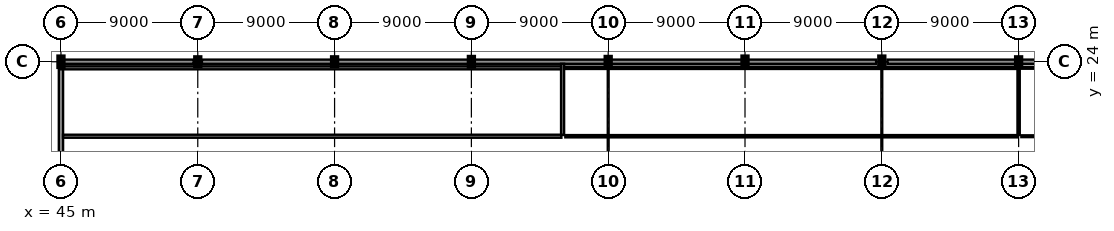
"""IFC4 building model, lengths in metres.
Left out: names, types, materials, properties, quantities, classifications, styles, units other than length and angle.
Written with IfcOpenShell. Run it as: python <this file> out.ifc"""

import sys

from ifc_helpers import new_model, si_unit, direction, frame, frame_2d, origin, origin_2d, place, context, subcontext, project, spatial, rectangle, i_section, extrude, element, fill, save


model = new_model("IFC4")
c1 = context("Model", 3, precision=1e-05, world=origin(), true_north=direction((0.0, 1.0)))
c2 = subcontext(c1, "Body", "Model", "MODEL_VIEW")
j1 = project(units=[si_unit("LENGTHUNIT", "METRE"), si_unit("PLANEANGLEUNIT", "RADIAN")], contexts=[c1])
p1 = place(None, origin())
s1 = spatial("IfcSite", under=j1, at=p1, CompositionType="ELEMENT")
p2 = place(p1, origin())
s2 = spatial("IfcBuilding", under=s1, at=p2, CompositionType="ELEMENT")
p3 = place(p2, frame((0.0, 0.0, 23.4)))
s3 = spatial("IfcBuildingStorey", under=s2, at=p3, CompositionType="ELEMENT", Elevation=23.4)
p4 = place(p3, frame((45.0, 24.0, 0.0), z_axis=(0.0, 0.0, 1.0), x_axis=(1.0, 0.0, 0.0)))
e1 = element("IfcColumn", 1, at=p4, inside=s3, PredefinedType="COLUMN", context=c2, shape_type="SweptSolid", body=[
    extrude(i_section(OverallWidth=0.3, OverallDepth=0.65, WebThickness=0.016, FlangeThickness=0.031, at=origin_2d()), origin(), (0.0, 0.0, 1.0), 4.0),
])
for number, where, z_axis, x_axis in (
    (2, (54.0, 24.0, 0.0), (0.0, 0.0, 1.0), (0.0, 1.0, 0.0)),
    (3, (63.0, 24.0, 0.0), (0.0, 0.0, 1.0), (1.0, 0.0, 0.0)),
):
    element("IfcColumn", number, at=place(p3, frame(where, z_axis=z_axis, x_axis=x_axis)), inside=s3, PredefinedType="COLUMN", context=c2, shape_type="SweptSolid", body=[
        extrude(i_section(OverallWidth=0.3, OverallDepth=0.55, WebThickness=0.015, FlangeThickness=0.029, at=origin_2d()), origin(), (0.0, 0.0, 1.0), 4.0),
    ])
for number, where, z_axis, x_axis in (
    (4, (72.0, 24.0, 0.0), (0.0, 0.0, 1.0), (1.0, 0.0, 0.0)),
    (5, (81.0, 24.0, 0.0), (0.0, 0.0, 1.0), (1.0, 0.0, 0.0)),
):
    element("IfcColumn", number, at=place(p3, frame(where, z_axis=z_axis, x_axis=x_axis)), inside=s3, PredefinedType="COLUMN", context=c2, shape_type="SweptSolid", body=[
        extrude(i_section(OverallWidth=0.3, OverallDepth=0.6, WebThickness=0.015, FlangeThickness=0.03, at=origin_2d()), origin(), (0.0, 0.0, 1.0), 4.0),
    ])
for number, where, z_axis, x_axis in (
    (6, (90.0, 24.0, 0.0), (0.0, 0.0, 1.0), (1.0, 0.0, 0.0)),
    (7, (99.0, 24.0, 0.0), (0.0, 0.0, 1.0), (0.0, 1.0, 0.0)),
):
    element("IfcColumn", number, at=place(p3, frame(where, z_axis=z_axis, x_axis=x_axis)), inside=s3, PredefinedType="COLUMN", context=c2, shape_type="SweptSolid", body=[
        extrude(i_section(OverallWidth=0.3, OverallDepth=0.65, WebThickness=0.016, FlangeThickness=0.031, at=origin_2d()), origin(), (0.0, 0.0, 1.0), 4.0),
    ])
p5 = place(p3, frame((108.0, 24.0, 0.0), z_axis=(0.0, 0.0, 1.0), x_axis=(1.0, 0.0, 0.0)))
e8 = element("IfcColumn", 8, at=p5, inside=s3, PredefinedType="COLUMN", context=c2, shape_type="SweptSolid", body=[
    extrude(i_section(OverallWidth=0.3, OverallDepth=0.55, WebThickness=0.015, FlangeThickness=0.029, at=origin_2d()), origin(), (0.0, 0.0, 1.0), 4.0),
])
p6 = place(p3, frame((80.942, 24.0, 0.0), z_axis=(0.0, 0.0, 1.0), x_axis=(-1.0, 0.0, 0.0)))
e9 = element("IfcWall", 9, at=p6, inside=s3, PredefinedType="SOLIDWALL", context=c2, shape_type="SweptSolid", body=[
    extrude(rectangle(XDim=8.934, YDim=0.28, at=frame_2d((4.467, 0.0))), origin(), (0.0, 0.0, 1.0), 3.315),
])
p7 = place(p6, frame((3.182, 0.0, 0.85)))
e10 = element("IfcOpeningElement", 10, at=p7, cuts=e9, PredefinedType="OPENING", context=c2, shape_type="SweptSolid", body=[
    extrude(rectangle(XDim=2.0, YDim=2.0, at=frame_2d((1.0, 1.0))), frame((0.0, 0.155, 0.0), z_axis=(0.0, -1.0, 0.0), x_axis=(1.0, 0.0, 0.0)), (0.0, 0.0, 1.0), 0.31),
])
p8 = place(p3, frame((71.992, 24.0, 0.0), z_axis=(0.0, 0.0, 1.0), x_axis=(-1.0, 0.0, 0.0)))
e11 = element("IfcWall", 11, at=p8, inside=s3, PredefinedType="SOLIDWALL", context=c2, shape_type="SweptSolid", body=[
    extrude(rectangle(XDim=8.984, YDim=0.28, at=frame_2d((4.492, 0.0))), origin(), (0.0, 0.0, 1.0), 2.747),
])
p9 = place(p8, frame((2.045, 0.0, 0.9)))
e12 = element("IfcOpeningElement", 12, at=p9, cuts=e11, PredefinedType="OPENING", context=c2, shape_type="SweptSolid", body=[
    extrude(rectangle(XDim=1.3, YDim=1.3, at=frame_2d((0.65, 0.65))), frame((0.0, 0.155, 0.0), z_axis=(0.0, -1.0, 0.0), x_axis=(1.0, 0.0, 0.0)), (0.0, 0.0, 1.0), 0.31),
])
p10 = place(p8, frame((5.639, 0.0, 0.9)))
e13 = element("IfcOpeningElement", 13, at=p10, cuts=e11, PredefinedType="OPENING", context=c2, shape_type="SweptSolid", body=[
    extrude(rectangle(XDim=1.3, YDim=1.3, at=frame_2d((0.65, 0.65))), frame((0.0, 0.155, 0.0), z_axis=(0.0, -1.0, 0.0), x_axis=(1.0, 0.0, 0.0)), (0.0, 0.0, 1.0), 0.31),
])
p11 = place(p3, frame((62.992, 24.0, 0.0), z_axis=(0.0, 0.0, 1.0), x_axis=(-1.0, 0.0, 0.0)))
e14 = element("IfcWall", 14, at=p11, inside=s3, PredefinedType="SOLIDWALL", context=c2, shape_type="SweptSolid", body=[
    extrude(rectangle(XDim=8.719, YDim=0.28, at=frame_2d((4.359, 0.0))), origin(), (0.0, 0.0, 1.0), 2.747),
])
p12 = place(p11, frame((1.966, 0.0, 0.9)))
e15 = element("IfcOpeningElement", 15, at=p12, cuts=e14, PredefinedType="OPENING", context=c2, shape_type="SweptSolid", body=[
    extrude(rectangle(XDim=1.3, YDim=1.3, at=frame_2d((0.65, 0.65))), frame((0.0, 0.155, 0.0), z_axis=(0.0, -1.0, 0.0), x_axis=(1.0, 0.0, 0.0)), (0.0, 0.0, 1.0), 0.31),
])
p13 = place(p11, frame((5.453, 0.0, 0.9)))
e16 = element("IfcOpeningElement", 16, at=p13, cuts=e14, PredefinedType="OPENING", context=c2, shape_type="SweptSolid", body=[
    extrude(rectangle(XDim=1.3, YDim=1.3, at=frame_2d((0.65, 0.65))), frame((0.0, 0.155, 0.0), z_axis=(0.0, -1.0, 0.0), x_axis=(1.0, 0.0, 0.0)), (0.0, 0.0, 1.0), 0.31),
])
p14 = place(p3, frame((53.727, 24.0, 0.0), z_axis=(0.0, 0.0, 1.0), x_axis=(-1.0, 0.0, 0.0)))
e17 = element("IfcWall", 17, at=p14, inside=s3, PredefinedType="SOLIDWALL", context=c2, shape_type="SweptSolid", body=[
    extrude(rectangle(XDim=8.719, YDim=0.28, at=frame_2d((4.359, 0.0))), origin(), (0.0, 0.0, 1.0), 2.747),
])
p15 = place(p14, frame((1.966, 0.0, 0.9)))
e18 = element("IfcOpeningElement", 18, at=p15, cuts=e17, PredefinedType="OPENING", context=c2, shape_type="SweptSolid", body=[
    extrude(rectangle(XDim=1.3, YDim=1.3, at=frame_2d((0.65, 0.65))), frame((0.0, 0.155, 0.0), z_axis=(0.0, -1.0, 0.0), x_axis=(1.0, 0.0, 0.0)), (0.0, 0.0, 1.0), 0.31),
])
p16 = place(p14, frame((5.453, 0.0, 0.9)))
e19 = element("IfcOpeningElement", 19, at=p16, cuts=e17, PredefinedType="OPENING", context=c2, shape_type="SweptSolid", body=[
    extrude(rectangle(XDim=1.3, YDim=1.3, at=frame_2d((0.65, 0.65))), frame((0.0, 0.155, 0.0), z_axis=(0.0, -1.0, 0.0), x_axis=(1.0, 0.0, 0.0)), (0.0, 0.0, 1.0), 0.31),
])
p17 = place(p3, frame((45.0, 23.677, 0.0), z_axis=(0.0, 0.0, 1.0), x_axis=(0.0, -1.0, 0.0)))
e20 = element("IfcWall", 20, at=p17, inside=s3, PredefinedType="SOLIDWALL", context=c2, shape_type="SweptSolid", body=[
    extrude(rectangle(XDim=11.529, YDim=0.28, at=frame_2d((5.765, 0.0))), origin(), (0.0, 0.0, 1.0), 3.155),
])
p18 = place(p17, frame((2.809, 0.0, 0.9)))
e21 = element("IfcOpeningElement", 21, at=p18, cuts=e20, PredefinedType="OPENING", context=c2, shape_type="SweptSolid", body=[
    extrude(rectangle(XDim=1.3, YDim=1.3, at=frame_2d((0.65, 0.65))), frame((0.0, 0.155, 0.0), z_axis=(0.0, -1.0, 0.0), x_axis=(1.0, 0.0, 0.0)), (0.0, 0.0, 1.0), 0.31),
])
p19 = place(p17, frame((8.117, 0.0, 0.9)))
e22 = element("IfcOpeningElement", 22, at=p19, cuts=e20, PredefinedType="OPENING", context=c2, shape_type="SweptSolid", body=[
    extrude(rectangle(XDim=1.3, YDim=1.3, at=frame_2d((0.65, 0.65))), frame((0.0, 0.155, 0.0), z_axis=(0.0, -1.0, 0.0), x_axis=(1.0, 0.0, 0.0)), (0.0, 0.0, 1.0), 0.31),
])
p20 = place(p3, frame((98.627, 24.0, 0.0), z_axis=(0.0, 0.0, 1.0), x_axis=(-1.0, 0.0, 0.0)))
e23 = element("IfcWall", 23, at=p20, inside=s3, PredefinedType="SOLIDWALL", context=c2, shape_type="SweptSolid", body=[
    extrude(rectangle(XDim=8.619, YDim=0.28, at=frame_2d((4.31, 0.0))), origin(), (0.0, 0.0, 1.0), 3.315),
])
p21 = place(p20, frame((1.413, 0.0, 0.85)))
e24 = element("IfcOpeningElement", 24, at=p21, cuts=e23, PredefinedType="OPENING", context=c2, shape_type="SweptSolid", body=[
    extrude(rectangle(XDim=2.0, YDim=2.0, at=frame_2d((1.0, 1.0))), frame((0.0, 0.155, 0.0), z_axis=(0.0, -1.0, 0.0), x_axis=(1.0, 0.0, 0.0)), (0.0, 0.0, 1.0), 0.31),
])
p22 = place(p20, frame((5.206, 0.0, 0.85)))
e25 = element("IfcOpeningElement", 25, at=p22, cuts=e23, PredefinedType="OPENING", context=c2, shape_type="SweptSolid", body=[
    extrude(rectangle(XDim=2.0, YDim=2.0, at=frame_2d((1.0, 1.0))), frame((0.0, 0.155, 0.0), z_axis=(0.0, -1.0, 0.0), x_axis=(1.0, 0.0, 0.0)), (0.0, 0.0, 1.0), 0.31),
])
p23 = place(p3, frame((89.992, 24.0, 0.0), z_axis=(0.0, 0.0, 1.0), x_axis=(-1.0, 0.0, 0.0)))
e26 = element("IfcWall", 26, at=p23, inside=s3, PredefinedType="SOLIDWALL", context=c2, shape_type="SweptSolid", body=[
    extrude(rectangle(XDim=8.934, YDim=0.28, at=frame_2d((4.467, 0.0))), origin(), (0.0, 0.0, 1.0), 3.315),
])
p24 = place(p23, frame((1.502, 0.0, 0.85)))
e27 = element("IfcOpeningElement", 27, at=p24, cuts=e26, PredefinedType="OPENING", context=c2, shape_type="SweptSolid", body=[
    extrude(rectangle(XDim=2.0, YDim=2.0, at=frame_2d((1.0, 1.0))), frame((0.0, 0.155, 0.0), z_axis=(0.0, -1.0, 0.0), x_axis=(1.0, 0.0, 0.0)), (0.0, 0.0, 1.0), 0.31),
])
p25 = place(p23, frame((5.432, 0.0, 0.85)))
e28 = element("IfcOpeningElement", 28, at=p25, cuts=e26, PredefinedType="OPENING", context=c2, shape_type="SweptSolid", body=[
    extrude(rectangle(XDim=2.0, YDim=2.0, at=frame_2d((1.0, 1.0))), frame((0.0, 0.155, 0.0), z_axis=(0.0, -1.0, 0.0), x_axis=(1.0, 0.0, 0.0)), (0.0, 0.0, 1.0), 0.31),
])
p26 = place(p3, frame((116.992, 24.0, 0.0), z_axis=(0.0, 0.0, 1.0), x_axis=(-1.0, 0.0, 0.0)))
e29 = element("IfcWall", 29, at=p26, inside=s3, PredefinedType="SOLIDWALL", context=c2, shape_type="SweptSolid", body=[
    extrude(rectangle(XDim=8.984, YDim=0.28, at=frame_2d((4.492, 0.0))), origin(), (0.0, 0.0, 1.0), 2.747),
])
p27 = place(p26, frame((2.045, 0.0, 0.9)))
e30 = element("IfcOpeningElement", 30, at=p27, cuts=e29, PredefinedType="OPENING", context=c2, shape_type="SweptSolid", body=[
    extrude(rectangle(XDim=1.3, YDim=1.3, at=frame_2d((0.65, 0.65))), frame((0.0, 0.155, 0.0), z_axis=(0.0, -1.0, 0.0), x_axis=(1.0, 0.0, 0.0)), (0.0, 0.0, 1.0), 0.31),
])
p28 = place(p26, frame((5.639, 0.0, 0.9)))
e31 = element("IfcOpeningElement", 31, at=p28, cuts=e29, PredefinedType="OPENING", context=c2, shape_type="SweptSolid", body=[
    extrude(rectangle(XDim=1.3, YDim=1.3, at=frame_2d((0.65, 0.65))), frame((0.0, 0.155, 0.0), z_axis=(0.0, -1.0, 0.0), x_axis=(1.0, 0.0, 0.0)), (0.0, 0.0, 1.0), 0.31),
])
p29 = place(p3, frame((107.992, 24.0, 0.0), z_axis=(0.0, 0.0, 1.0), x_axis=(-1.0, 0.0, 0.0)))
e32 = element("IfcWall", 32, at=p29, inside=s3, PredefinedType="SOLIDWALL", context=c2, shape_type="SweptSolid", body=[
    extrude(rectangle(XDim=8.619, YDim=0.28, at=frame_2d((4.31, 0.0))), origin(), (0.0, 0.0, 1.0), 3.315),
])
p30 = place(p29, frame((1.413, 0.0, 0.85)))
e33 = element("IfcOpeningElement", 33, at=p30, cuts=e32, PredefinedType="OPENING", context=c2, shape_type="SweptSolid", body=[
    extrude(rectangle(XDim=2.0, YDim=2.0, at=frame_2d((1.0, 1.0))), frame((0.0, 0.155, 0.0), z_axis=(0.0, -1.0, 0.0), x_axis=(1.0, 0.0, 0.0)), (0.0, 0.0, 1.0), 0.31),
])
p31 = place(p29, frame((5.206, 0.0, 0.85)))
e34 = element("IfcOpeningElement", 34, at=p31, cuts=e32, PredefinedType="OPENING", context=c2, shape_type="SweptSolid", body=[
    extrude(rectangle(XDim=2.0, YDim=2.0, at=frame_2d((1.0, 1.0))), frame((0.0, 0.155, 0.0), z_axis=(0.0, -1.0, 0.0), x_axis=(1.0, 0.0, 0.0)), (0.0, 0.0, 1.0), 0.31),
])
p32 = place(p3, frame((45.008, 23.6, 0.0), z_axis=(0.0, 0.0, 1.0), x_axis=(1.0, 0.0, 0.0)))
e35 = element("IfcWall", 35, at=p32, inside=s3, PredefinedType="PARTITIONING", context=c2, shape_type="SweptSolid", body=[
    extrude(rectangle(XDim=32.912, YDim=0.2, at=frame_2d((16.456, 0.0))), origin(), (0.0, 0.0, 1.0), 3.64),
])
p33 = place(p3, frame((78.0, 23.865, 0.0), z_axis=(0.0, 0.0, 1.0), x_axis=(0.0, -1.0, 0.0)))
e36 = element("IfcWall", 36, at=p33, inside=s3, PredefinedType="PARTITIONING", context=c2, shape_type="SweptSolid", body=[
    extrude(rectangle(XDim=4.685, YDim=0.2, at=frame_2d((2.343, 0.0))), origin(), (0.0, 0.0, 1.0), 3.555),
])
p34 = place(p3, frame((77.92, 19.1, 0.0), z_axis=(0.0, 0.0, 1.0), x_axis=(-1.0, 0.0, 0.0)))
e37 = element("IfcWall", 37, at=p34, inside=s3, PredefinedType="PARTITIONING", context=c2, shape_type="SweptSolid", body=[
    extrude(rectangle(XDim=32.785, YDim=0.2, at=frame_2d((16.393, 0.0))), origin(), (0.0, 0.0, 1.0), 3.64),
])
p35 = place(p34, frame((15.442, 0.0, 0.0)))
e38 = element("IfcOpeningElement", 38, at=p35, cuts=e37, PredefinedType="OPENING", context=c2, shape_type="SweptSolid", body=[
    extrude(rectangle(XDim=1.9, YDim=2.5, at=frame_2d((0.95, 1.25))), frame((0.0, 0.115, 0.0), z_axis=(0.0, -1.0, 0.0), x_axis=(1.0, 0.0, 0.0)), (0.0, 0.0, 1.0), 0.23),
])
p36 = place(p3, frame((108.0, 23.52, 0.0), z_axis=(0.0, 0.0, 1.0), x_axis=(0.0, -1.0, 0.0)))
e39 = element("IfcWall", 39, at=p36, inside=s3, PredefinedType="PARTITIONING", context=c2, shape_type="SweptSolid", body=[
    extrude(rectangle(XDim=4.34, YDim=0.15, at=frame_2d((2.17, 0.0))), origin(), (0.0, 0.0, 1.0), 3.405),
])
p37 = place(p3, frame((107.92, 19.1, 0.0), z_axis=(0.0, 0.0, 1.0), x_axis=(-1.0, 0.0, 0.0)))
e40 = element("IfcWall", 40, at=p37, inside=s3, PredefinedType="PARTITIONING", context=c2, shape_type="SweptSolid", body=[
    extrude(rectangle(XDim=29.74, YDim=0.15, at=frame_2d((14.87, 0.0))), origin(), (0.0, 0.0, 1.0), 3.64),
])
p38 = place(p37, frame((14.345, 0.0, 0.0)))
e41 = element("IfcOpeningElement", 41, at=p38, cuts=e40, PredefinedType="OPENING", context=c2, shape_type="SweptSolid", body=[
    extrude(rectangle(XDim=1.05, YDim=2.25, at=frame_2d((0.525, 1.125))), frame((0.0, 0.09, 0.0), z_axis=(0.0, -1.0, 0.0), x_axis=(1.0, 0.0, 0.0)), (0.0, 0.0, 1.0), 0.18),
])
p39 = place(p3, frame((78.095, 23.6, 0.0), z_axis=(0.0, 0.0, 1.0), x_axis=(1.0, 0.0, 0.0)))
e42 = element("IfcWall", 42, at=p39, inside=s3, PredefinedType="PARTITIONING", context=c2, shape_type="SweptSolid", body=[
    extrude(rectangle(XDim=29.825, YDim=0.15, at=frame_2d((14.913, 0.0))), origin(), (0.0, 0.0, 1.0), 3.64),
])
p40 = place(p3, frame((147.465, 19.1, 0.0), z_axis=(0.0, 0.0, 1.0), x_axis=(-1.0, 0.0, 0.0)))
e43 = element("IfcWall", 43, at=p40, inside=s3, PredefinedType="PARTITIONING", context=c2, shape_type="SweptSolid", body=[
    extrude(rectangle(XDim=39.285, YDim=0.12, at=frame_2d((19.643, 0.0))), origin(), (0.0, 0.0, 1.0), 3.64),
])
p41 = place(p40, frame((19.192, 0.0, 0.0)))
e44 = element("IfcOpeningElement", 44, at=p41, cuts=e43, PredefinedType="OPENING", context=c2, shape_type="SweptSolid", body=[
    extrude(rectangle(XDim=0.9, YDim=2.1, at=frame_2d((0.45, 1.05))), frame((0.0, 0.075, 0.0), z_axis=(0.0, -1.0, 0.0), x_axis=(1.0, 0.0, 0.0)), (0.0, 0.0, 1.0), 0.15),
])
p42 = place(p3, frame((108.18, 23.6, 0.0), z_axis=(0.0, 0.0, 1.0), x_axis=(1.0, 0.0, 0.0)))
e45 = element("IfcWall", 45, at=p42, inside=s3, PredefinedType="PARTITIONING", context=c2, shape_type="SweptSolid", body=[
    extrude(rectangle(XDim=39.285, YDim=0.12, at=frame_2d((19.643, 0.0))), origin(), (0.0, 0.0, 1.0), 3.64),
])
p43 = place(p7, origin())
e46 = element("IfcWindow", 46, at=p43, inside=s3, PartitioningType="SINGLE_PANEL", PredefinedType="WINDOW", context=c2, shape_type="SweptSolid", body=[
    extrude(rectangle(XDim=2.0, YDim=2.0, at=frame_2d((1.0, 1.0))), frame((0.0, 0.03, 0.0), z_axis=(0.0, -1.0, 0.0), x_axis=(1.0, 0.0, 0.0)), (0.0, 0.0, 1.0), 0.06),
])
fill(e10, e46)
p44 = place(p9, origin())
e47 = element("IfcWindow", 47, at=p44, inside=s3, PartitioningType="SINGLE_PANEL", PredefinedType="WINDOW", context=c2, shape_type="SweptSolid", body=[
    extrude(rectangle(XDim=1.3, YDim=1.3, at=frame_2d((0.65, 0.65))), frame((0.0, 0.03, 0.0), z_axis=(0.0, -1.0, 0.0), x_axis=(1.0, 0.0, 0.0)), (0.0, 0.0, 1.0), 0.06),
])
fill(e12, e47)
p45 = place(p10, origin())
e48 = element("IfcWindow", 48, at=p45, inside=s3, PartitioningType="SINGLE_PANEL", PredefinedType="WINDOW", context=c2, shape_type="SweptSolid", body=[
    extrude(rectangle(XDim=1.3, YDim=1.3, at=frame_2d((0.65, 0.65))), frame((0.0, 0.03, 0.0), z_axis=(0.0, -1.0, 0.0), x_axis=(1.0, 0.0, 0.0)), (0.0, 0.0, 1.0), 0.06),
])
fill(e13, e48)
p46 = place(p12, origin())
e49 = element("IfcWindow", 49, at=p46, inside=s3, PartitioningType="SINGLE_PANEL", PredefinedType="WINDOW", context=c2, shape_type="SweptSolid", body=[
    extrude(rectangle(XDim=1.3, YDim=1.3, at=frame_2d((0.65, 0.65))), frame((0.0, 0.03, 0.0), z_axis=(0.0, -1.0, 0.0), x_axis=(1.0, 0.0, 0.0)), (0.0, 0.0, 1.0), 0.06),
])
fill(e15, e49)
p47 = place(p13, origin())
e50 = element("IfcWindow", 50, at=p47, inside=s3, PartitioningType="SINGLE_PANEL", PredefinedType="WINDOW", context=c2, shape_type="SweptSolid", body=[
    extrude(rectangle(XDim=1.3, YDim=1.3, at=frame_2d((0.65, 0.65))), frame((0.0, 0.03, 0.0), z_axis=(0.0, -1.0, 0.0), x_axis=(1.0, 0.0, 0.0)), (0.0, 0.0, 1.0), 0.06),
])
fill(e16, e50)
p48 = place(p15, origin())
e51 = element("IfcWindow", 51, at=p48, inside=s3, PartitioningType="SINGLE_PANEL", PredefinedType="WINDOW", context=c2, shape_type="SweptSolid", body=[
    extrude(rectangle(XDim=1.3, YDim=1.3, at=frame_2d((0.65, 0.65))), frame((0.0, 0.03, 0.0), z_axis=(0.0, -1.0, 0.0), x_axis=(1.0, 0.0, 0.0)), (0.0, 0.0, 1.0), 0.06),
])
fill(e18, e51)
p49 = place(p16, origin())
e52 = element("IfcWindow", 52, at=p49, inside=s3, PartitioningType="SINGLE_PANEL", PredefinedType="WINDOW", context=c2, shape_type="SweptSolid", body=[
    extrude(rectangle(XDim=1.3, YDim=1.3, at=frame_2d((0.65, 0.65))), frame((0.0, 0.03, 0.0), z_axis=(0.0, -1.0, 0.0), x_axis=(1.0, 0.0, 0.0)), (0.0, 0.0, 1.0), 0.06),
])
fill(e19, e52)
p50 = place(p18, origin())
e53 = element("IfcWindow", 53, at=p50, inside=s3, PartitioningType="SINGLE_PANEL", PredefinedType="WINDOW", context=c2, shape_type="SweptSolid", body=[
    extrude(rectangle(XDim=1.3, YDim=1.3, at=frame_2d((0.65, 0.65))), frame((0.0, 0.03, 0.0), z_axis=(0.0, -1.0, 0.0), x_axis=(1.0, 0.0, 0.0)), (0.0, 0.0, 1.0), 0.06),
])
fill(e21, e53)
p51 = place(p21, origin())
e54 = element("IfcWindow", 54, at=p51, inside=s3, PartitioningType="SINGLE_PANEL", PredefinedType="WINDOW", context=c2, shape_type="SweptSolid", body=[
    extrude(rectangle(XDim=2.0, YDim=2.0, at=frame_2d((1.0, 1.0))), frame((0.0, 0.03, 0.0), z_axis=(0.0, -1.0, 0.0), x_axis=(1.0, 0.0, 0.0)), (0.0, 0.0, 1.0), 0.06),
])
fill(e24, e54)
p52 = place(p22, origin())
e55 = element("IfcWindow", 55, at=p52, inside=s3, PartitioningType="SINGLE_PANEL", PredefinedType="WINDOW", context=c2, shape_type="SweptSolid", body=[
    extrude(rectangle(XDim=2.0, YDim=2.0, at=frame_2d((1.0, 1.0))), frame((0.0, 0.03, 0.0), z_axis=(0.0, -1.0, 0.0), x_axis=(1.0, 0.0, 0.0)), (0.0, 0.0, 1.0), 0.06),
])
fill(e25, e55)
p53 = place(p24, origin())
e56 = element("IfcWindow", 56, at=p53, inside=s3, PartitioningType="SINGLE_PANEL", PredefinedType="WINDOW", context=c2, shape_type="SweptSolid", body=[
    extrude(rectangle(XDim=2.0, YDim=2.0, at=frame_2d((1.0, 1.0))), frame((0.0, 0.03, 0.0), z_axis=(0.0, -1.0, 0.0), x_axis=(1.0, 0.0, 0.0)), (0.0, 0.0, 1.0), 0.06),
])
fill(e27, e56)
p54 = place(p25, origin())
e57 = element("IfcWindow", 57, at=p54, inside=s3, PartitioningType="SINGLE_PANEL", PredefinedType="WINDOW", context=c2, shape_type="SweptSolid", body=[
    extrude(rectangle(XDim=2.0, YDim=2.0, at=frame_2d((1.0, 1.0))), frame((0.0, 0.03, 0.0), z_axis=(0.0, -1.0, 0.0), x_axis=(1.0, 0.0, 0.0)), (0.0, 0.0, 1.0), 0.06),
])
fill(e28, e57)
p55 = place(p30, origin())
e58 = element("IfcWindow", 58, at=p55, inside=s3, PartitioningType="SINGLE_PANEL", PredefinedType="WINDOW", context=c2, shape_type="SweptSolid", body=[
    extrude(rectangle(XDim=2.0, YDim=2.0, at=frame_2d((1.0, 1.0))), frame((0.0, 0.03, 0.0), z_axis=(0.0, -1.0, 0.0), x_axis=(1.0, 0.0, 0.0)), (0.0, 0.0, 1.0), 0.06),
])
fill(e33, e58)
p56 = place(p31, origin())
e59 = element("IfcWindow", 59, at=p56, inside=s3, PartitioningType="SINGLE_PANEL", PredefinedType="WINDOW", context=c2, shape_type="SweptSolid", body=[
    extrude(rectangle(XDim=2.0, YDim=2.0, at=frame_2d((1.0, 1.0))), frame((0.0, 0.03, 0.0), z_axis=(0.0, -1.0, 0.0), x_axis=(1.0, 0.0, 0.0)), (0.0, 0.0, 1.0), 0.06),
])
fill(e34, e59)
p57 = place(p35, origin())
e60 = element("IfcDoor", 60, at=p57, inside=s3, OperationType="DOUBLE_DOOR_SINGLE_SWING", PredefinedType="DOOR", context=c2, shape_type="SweptSolid", body=[
    extrude(rectangle(XDim=1.9, YDim=2.5, at=frame_2d((0.95, 1.25))), frame((0.0, 0.025, 0.0), z_axis=(0.0, -1.0, 0.0), x_axis=(1.0, 0.0, 0.0)), (0.0, 0.0, 1.0), 0.05),
])
fill(e38, e60)
p58 = place(p38, frame((1.05, 0.0, 0.0), z_axis=(0.0, 0.0, 1.0), x_axis=(-1.0, 0.0, 0.0)))
e61 = element("IfcDoor", 61, at=p58, inside=s3, OperationType="SINGLE_SWING_LEFT", PredefinedType="DOOR", context=c2, shape_type="SweptSolid", body=[
    extrude(rectangle(XDim=1.05, YDim=2.25, at=frame_2d((0.525, 1.125))), frame((0.0, 0.025, 0.0), z_axis=(0.0, -1.0, 0.0), x_axis=(1.0, 0.0, 0.0)), (0.0, 0.0, 1.0), 0.05),
])
fill(e41, e61)
save(model, sys.argv[1])
